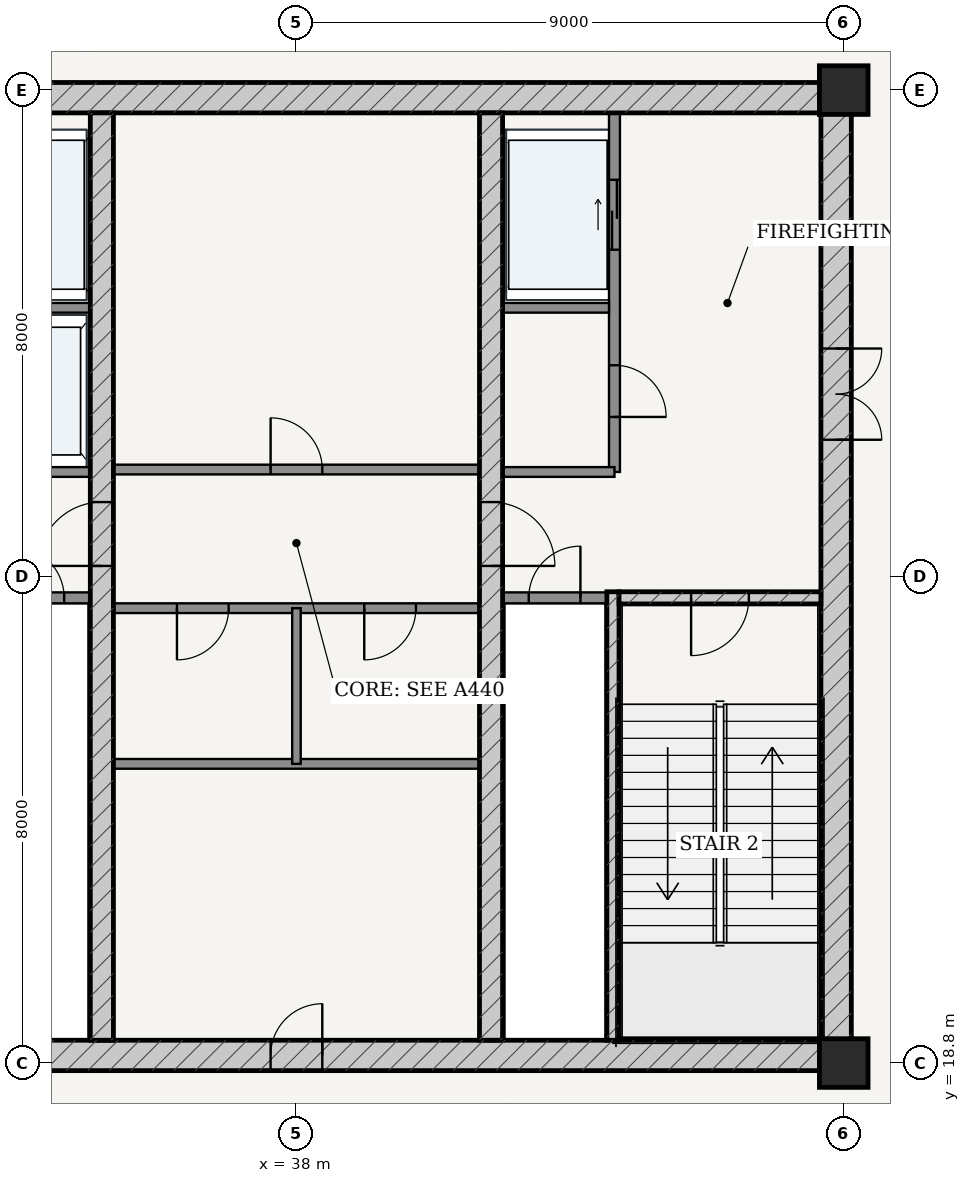
"""IFC4 building model, lengths in metres.
Left out: names, types, materials, properties, quantities, classifications, styles, units other than length and angle.
Written with IfcOpenShell. Run it as: python <this file> out.ifc"""

import sys

from ifc_helpers import new_model, si_unit, direction, frame, frame_2d, origin, origin_2d, place, context, subcontext, project, spatial, rectangle, extrude, source, transform, mapped, element, fill, save


model = new_model("IFC4")
c1 = context("Model", 3, precision=1e-05, world=origin(), true_north=direction((-0.2419218956, 0.970295726276)))
c2 = subcontext(c1, "Body", "Model", "MODEL_VIEW")
j1 = project(units=[si_unit("LENGTHUNIT", "METRE"), si_unit("PLANEANGLEUNIT", "RADIAN")], contexts=[c1])
p1 = place(None, origin())
s1 = spatial("IfcSite", under=j1, at=p1, CompositionType="ELEMENT")
p2 = place(p1, origin())
s2 = spatial("IfcBuilding", under=s1, at=p2, CompositionType="ELEMENT")
p3 = place(p2, frame((0.0, 0.0, 321.7)))
s3 = spatial("IfcBuildingStorey", under=s2, at=p3, CompositionType="ELEMENT", Elevation=321.7)
for number, where, z_axis, x_axis in (
    (1, (47.0, 18.8, 0.0), (0.0, 0.0, 1.0), (1.0, 0.0, 0.0)),
    (2, (47.0, 34.8, 0.0), (0.0, 0.0, 1.0), (1.0, 0.0, 0.0)),
):
    element("IfcColumn", number, at=place(p3, frame(where, z_axis=z_axis, x_axis=x_axis)), inside=s3, PredefinedType="COLUMN", context=c2, shape_type="SweptSolid", body=[
        extrude(rectangle(XDim=0.8, YDim=0.8, at=origin_2d()), origin(), (0.0, 0.0, 1.0), 5.2),
    ])
p4 = place(p3, frame((28.875, 18.925, 0.0), z_axis=(0.0, 0.0, 1.0), x_axis=(1.0, 0.0, 0.0)))
e3 = element("IfcWall", 3, at=p4, inside=s3, PredefinedType="SHEAR", context=c2, shape_type="SweptSolid", body=[
    extrude(rectangle(XDim=18.25, YDim=0.5, at=frame_2d((9.125, 0.0))), origin(), (0.0, 0.0, 1.0), 4.78),
])
p5 = place(p4, frame((8.7, 0.0, 0.0)))
e4 = element("IfcOpeningElement", 4, at=p5, cuts=e3, PredefinedType="OPENING", context=c2, shape_type="SweptSolid", body=[
    extrude(rectangle(XDim=0.85, YDim=2.1, at=frame_2d((0.425, 1.05))), frame((0.0, 0.26, 0.0), z_axis=(0.0, -1.0, 0.0), x_axis=(1.0, 0.0, 0.0)), (0.0, 0.0, 1.0), 0.52),
])
p6 = place(p3, frame((28.875, 34.675, 0.0), z_axis=(0.0, 0.0, 1.0), x_axis=(1.0, 0.0, 0.0)))
e5 = element("IfcWall", 5, at=p6, inside=s3, PredefinedType="SHEAR", context=c2, shape_type="SweptSolid", body=[
    extrude(rectangle(XDim=18.25, YDim=0.5, at=frame_2d((9.125, 0.0))), origin(), (0.0, 0.0, 1.0), 4.78),
])
p7 = place(p3, frame((46.875, 19.175, 0.0), z_axis=(0.0, 0.0, 1.0), x_axis=(0.0, 1.0, 0.0)))
e6 = element("IfcWall", 6, at=p7, inside=s3, PredefinedType="SHEAR", context=c2, shape_type="SweptSolid", body=[
    extrude(rectangle(XDim=15.25, YDim=0.5, at=frame_2d((7.625, 0.0))), origin(), (0.0, 0.0, 1.0), 4.78),
])
p8 = place(p7, frame((9.875, 0.0, 0.0)))
e7 = element("IfcOpeningElement", 7, at=p8, cuts=e6, PredefinedType="OPENING", context=c2, shape_type="SweptSolid", body=[
    extrude(rectangle(XDim=1.5, YDim=2.2, at=frame_2d((0.75, 1.1))), frame((0.0, 0.26, 0.0), z_axis=(0.0, -1.0, 0.0), x_axis=(1.0, 0.0, 0.0)), (0.0, 0.0, 1.0), 0.52),
])
p9 = place(p3, frame((43.205, 19.175, 0.0), z_axis=(0.0, 0.0, 1.0), x_axis=(0.0, 1.0, 0.0)))
e8 = element("IfcWall", 8, at=p9, inside=s3, PredefinedType="SOLIDWALL", context=c2, shape_type="SweptSolid", body=[
    extrude(rectangle(XDim=7.375, YDim=0.2, at=frame_2d((3.688, 0.0))), origin(), (0.0, 0.0, 1.0), 4.78),
])
p10 = place(p3, frame((43.305, 26.45, 0.0), z_axis=(0.0, 0.0, 1.0), x_axis=(1.0, 0.0, 0.0)))
e9 = element("IfcWall", 9, at=p10, inside=s3, PredefinedType="SOLIDWALL", context=c2, shape_type="SweptSolid", body=[
    extrude(rectangle(XDim=3.32, YDim=0.2, at=frame_2d((1.66, 0.0))), origin(), (0.0, 0.0, 1.0), 4.78),
])
p11 = place(p10, frame((1.185, 0.0, 0.0)))
e10 = element("IfcOpeningElement", 10, at=p11, cuts=e9, PredefinedType="OPENING", context=c2, shape_type="SweptSolid", body=[
    extrude(rectangle(XDim=0.95, YDim=2.15, at=frame_2d((0.475, 1.075))), frame((0.0, 0.11, 0.0), z_axis=(0.0, -1.0, 0.0), x_axis=(1.0, 0.0, 0.0)), (0.0, 0.0, 1.0), 0.22),
])
p12 = place(p3, frame((34.8, 19.175, 0.0), z_axis=(0.0, 0.0, 1.0), x_axis=(0.0, 1.0, 0.0)))
e11 = element("IfcWall", 11, at=p12, inside=s3, PredefinedType="SHEAR", context=c2, shape_type="SweptSolid", body=[
    extrude(rectangle(XDim=15.25, YDim=0.38, at=frame_2d((7.625, 0.0))), origin(), (0.0, 0.0, 1.0), 4.78),
])
p13 = place(p12, frame((7.8, 0.0, 0.0)))
e12 = element("IfcOpeningElement", 12, at=p13, cuts=e11, PredefinedType="OPENING", context=c2, shape_type="SweptSolid", body=[
    extrude(rectangle(XDim=1.05, YDim=2.15, at=frame_2d((0.525, 1.075))), frame((0.0, 0.2, 0.0), z_axis=(0.0, -1.0, 0.0), x_axis=(1.0, 0.0, 0.0)), (0.0, 0.0, 1.0), 0.4),
])
p14 = place(p3, frame((41.2, 19.175, 0.0), z_axis=(0.0, 0.0, 1.0), x_axis=(0.0, 1.0, 0.0)))
e13 = element("IfcWall", 13, at=p14, inside=s3, PredefinedType="SHEAR", context=c2, shape_type="SweptSolid", body=[
    extrude(rectangle(XDim=15.25, YDim=0.38, at=frame_2d((7.625, 0.0))), origin(), (0.0, 0.0, 1.0), 4.78),
])
p15 = place(p14, frame((7.8, 0.0, 0.0)))
e14 = element("IfcOpeningElement", 14, at=p15, cuts=e13, PredefinedType="OPENING", context=c2, shape_type="SweptSolid", body=[
    extrude(rectangle(XDim=1.05, YDim=2.15, at=frame_2d((0.525, 1.075))), frame((0.0, 0.2, 0.0), z_axis=(0.0, -1.0, 0.0), x_axis=(1.0, 0.0, 0.0)), (0.0, 0.0, 1.0), 0.4),
])
p16 = place(p3, frame((32.9, 26.45, 0.0), z_axis=(0.0, 0.0, 1.0), x_axis=(1.0, 0.0, 0.0)))
e15 = element("IfcWall", 15, at=p16, inside=s3, PredefinedType="PARTITIONING", context=c2, shape_type="SweptSolid", body=[
    extrude(rectangle(XDim=1.71, YDim=0.18, at=frame_2d((0.855, 0.0))), origin(), (0.0, 0.0, 1.0), 4.78),
])
p17 = place(p16, frame((0.43, 0.0, 0.0)))
e16 = element("IfcOpeningElement", 16, at=p17, cuts=e15, PredefinedType="OPENING", context=c2, shape_type="SweptSolid", body=[
    extrude(rectangle(XDim=0.85, YDim=2.1, at=frame_2d((0.425, 1.05))), frame((0.0, 0.1, 0.0), z_axis=(0.0, -1.0, 0.0), x_axis=(1.0, 0.0, 0.0)), (0.0, 0.0, 1.0), 0.2),
])
p18 = place(p3, frame((41.39, 26.45, 0.0), z_axis=(0.0, 0.0, 1.0), x_axis=(1.0, 0.0, 0.0)))
e17 = element("IfcWall", 17, at=p18, inside=s3, PredefinedType="PARTITIONING", context=c2, shape_type="SweptSolid", body=[
    extrude(rectangle(XDim=1.71, YDim=0.18, at=frame_2d((0.855, 0.0))), origin(), (0.0, 0.0, 1.0), 4.78),
])
p19 = place(p18, frame((0.43, 0.0, 0.0)))
e18 = element("IfcOpeningElement", 18, at=p19, cuts=e17, PredefinedType="OPENING", context=c2, shape_type="SweptSolid", body=[
    extrude(rectangle(XDim=0.85, YDim=2.1, at=frame_2d((0.425, 1.05))), frame((0.0, 0.1, 0.0), z_axis=(0.0, -1.0, 0.0), x_axis=(1.0, 0.0, 0.0)), (0.0, 0.0, 1.0), 0.2),
])
p20 = place(p3, frame((32.86, 31.22, 0.0), z_axis=(0.0, 0.0, 1.0), x_axis=(1.0, 0.0, 0.0)))
e19 = element("IfcWall", 19, at=p20, inside=s3, PredefinedType="PARTITIONING", context=c2, shape_type="SweptSolid", body=[
    extrude(rectangle(XDim=1.75, YDim=0.16, at=frame_2d((0.875, 0.0))), origin(), (0.0, 0.0, 1.0), 4.78),
])
p21 = place(p3, frame((32.77, 28.52, 0.0), z_axis=(0.0, 0.0, 1.0), x_axis=(1.0, 0.0, 0.0)))
e20 = element("IfcWall", 20, at=p21, inside=s3, PredefinedType="PARTITIONING", context=c2, shape_type="SweptSolid", body=[
    extrude(rectangle(XDim=1.84, YDim=0.16, at=frame_2d((0.92, 0.0))), origin(), (0.0, 0.0, 1.0), 4.78),
])
p22 = place(p3, frame((43.23, 28.52, 0.0), z_axis=(0.0, 0.0, 1.0), x_axis=(0.0, 1.0, 0.0)))
e21 = element("IfcWall", 21, at=p22, inside=s3, PredefinedType="PARTITIONING", context=c2, shape_type="SweptSolid", body=[
    extrude(rectangle(XDim=5.905, YDim=0.18, at=frame_2d((2.953, 0.0))), origin(), (0.0, 0.0, 1.0), 4.78),
])
p23 = place(p22, frame((0.905, 0.0, 0.0)))
e22 = element("IfcOpeningElement", 22, at=p23, cuts=e21, PredefinedType="OPENING", context=c2, shape_type="SweptSolid", body=[
    extrude(rectangle(XDim=0.85, YDim=2.1, at=frame_2d((0.425, 1.05))), frame((0.0, 0.1, 0.0), z_axis=(0.0, -1.0, 0.0), x_axis=(1.0, 0.0, 0.0)), (0.0, 0.0, 1.0), 0.2),
])
p24 = place(p22, frame((3.655, 0.0, 0.0)))
e23 = element("IfcOpeningElement", 23, at=p24, cuts=e21, PredefinedType="OPENING", context=c2, shape_type="SweptSolid", body=[
    extrude(rectangle(XDim=1.15, YDim=2.2, at=frame_2d((0.575, 1.1))), frame((0.0, 0.1, 0.0), z_axis=(0.0, -1.0, 0.0), x_axis=(1.0, 0.0, 0.0)), (0.0, 0.0, 1.0), 0.2),
])
p25 = place(p3, frame((41.39, 31.22, 0.0), z_axis=(0.0, 0.0, 1.0), x_axis=(1.0, 0.0, 0.0)))
e24 = element("IfcWall", 24, at=p25, inside=s3, PredefinedType="PARTITIONING", context=c2, shape_type="SweptSolid", body=[
    extrude(rectangle(XDim=1.75, YDim=0.16, at=frame_2d((0.875, 0.0))), origin(), (0.0, 0.0, 1.0), 4.78),
])
p26 = place(p3, frame((41.39, 28.52, 0.0), z_axis=(0.0, 0.0, 1.0), x_axis=(1.0, 0.0, 0.0)))
e25 = element("IfcWall", 25, at=p26, inside=s3, PredefinedType="PARTITIONING", context=c2, shape_type="SweptSolid", body=[
    extrude(rectangle(XDim=1.84, YDim=0.16, at=frame_2d((0.92, 0.0))), origin(), (0.0, 0.0, 1.0), 4.78),
])
p27 = place(p3, frame((34.99, 28.56, 0.0), z_axis=(0.0, 0.0, 1.0), x_axis=(1.0, 0.0, 0.0)))
e26 = element("IfcWall", 26, at=p27, inside=s3, PredefinedType="PARTITIONING", context=c2, shape_type="SweptSolid", body=[
    extrude(rectangle(XDim=6.02, YDim=0.16, at=frame_2d((3.01, 0.0))), origin(), (0.0, 0.0, 1.0), 4.78),
])
p28 = place(p27, frame((2.585, 0.0, 0.0)))
e27 = element("IfcOpeningElement", 27, at=p28, cuts=e26, PredefinedType="OPENING", context=c2, shape_type="SweptSolid", body=[
    extrude(rectangle(XDim=0.85, YDim=2.1, at=frame_2d((0.425, 1.05))), frame((0.0, 0.09, 0.0), z_axis=(0.0, -1.0, 0.0), x_axis=(1.0, 0.0, 0.0)), (0.0, 0.0, 1.0), 0.18),
])
p29 = place(p3, frame((34.99, 26.28, 0.0), z_axis=(0.0, 0.0, 1.0), x_axis=(1.0, 0.0, 0.0)))
e28 = element("IfcWall", 28, at=p29, inside=s3, PredefinedType="PARTITIONING", context=c2, shape_type="SweptSolid", body=[
    extrude(rectangle(XDim=6.02, YDim=0.16, at=frame_2d((3.01, 0.0))), origin(), (0.0, 0.0, 1.0), 4.78),
])
p30 = place(p29, frame((1.045, 0.0, 0.0)))
e29 = element("IfcOpeningElement", 29, at=p30, cuts=e28, PredefinedType="OPENING", context=c2, shape_type="SweptSolid", body=[
    extrude(rectangle(XDim=0.85, YDim=2.1, at=frame_2d((0.425, 1.05))), frame((0.0, 0.09, 0.0), z_axis=(0.0, -1.0, 0.0), x_axis=(1.0, 0.0, 0.0)), (0.0, 0.0, 1.0), 0.18),
])
p31 = place(p29, frame((4.125, 0.0, 0.0)))
e30 = element("IfcOpeningElement", 30, at=p31, cuts=e28, PredefinedType="OPENING", context=c2, shape_type="SweptSolid", body=[
    extrude(rectangle(XDim=0.85, YDim=2.1, at=frame_2d((0.425, 1.05))), frame((0.0, 0.09, 0.0), z_axis=(0.0, -1.0, 0.0), x_axis=(1.0, 0.0, 0.0)), (0.0, 0.0, 1.0), 0.18),
])
p32 = place(p3, frame((34.99, 23.72, 0.0), z_axis=(0.0, 0.0, 1.0), x_axis=(1.0, 0.0, 0.0)))
e31 = element("IfcWall", 31, at=p32, inside=s3, PredefinedType="PARTITIONING", context=c2, shape_type="SweptSolid", body=[
    extrude(rectangle(XDim=6.02, YDim=0.16, at=frame_2d((3.01, 0.0))), origin(), (0.0, 0.0, 1.0), 4.78),
])
p33 = place(p3, frame((38.0, 23.72, 0.0), z_axis=(0.0, 0.0, 1.0), x_axis=(0.0, 1.0, 0.0)))
e32 = element("IfcWall", 32, at=p33, inside=s3, PredefinedType="PARTITIONING", context=c2, shape_type="SweptSolid", body=[
    extrude(rectangle(XDim=2.56, YDim=0.14, at=frame_2d((1.28, 0.0))), origin(), (0.0, 0.0, 1.0), 4.78),
])
m1 = source(origin(), c2, "Body", "SweptSolid", [
    extrude(rectangle(XDim=1.5, YDim=2.2, at=frame_2d((0.75, 1.1))), frame((0.0, 0.025, 0.0), z_axis=(0.0, -1.0, 0.0), x_axis=(1.0, 0.0, 0.0)), (0.0, 0.0, 1.0), 0.05),
])
p34 = place(p8, frame((1.5, 0.0, 0.0), z_axis=(0.0, 0.0, 1.0), x_axis=(-1.0, 0.0, 0.0)))
e33 = element("IfcDoor", 33, at=p34, inside=s3, OperationType="DOUBLE_DOOR_SINGLE_SWING", PredefinedType="DOOR", context=c2, shape_type="MappedRepresentation", body=[
    mapped(m1, transform((0.0, 0.0, 0.0), scale=1.0)),
])
fill(e7, e33)
m2 = source(origin(), c2, "Body", "SweptSolid", [
    extrude(rectangle(XDim=1.05, YDim=2.15, at=frame_2d((0.525, 1.075))), frame((0.0, 0.025, 0.0), z_axis=(0.0, -1.0, 0.0), x_axis=(1.0, 0.0, 0.0)), (0.0, 0.0, 1.0), 0.05),
])
p35 = place(p13, origin())
e34 = element("IfcDoor", 34, at=p35, inside=s3, OperationType="SINGLE_SWING_LEFT", PredefinedType="DOOR", context=c2, shape_type="MappedRepresentation", body=[
    mapped(m2, transform((0.0, 0.0, 0.0), scale=1.0)),
])
fill(e12, e34)
p36 = place(p15, frame((1.05, 0.0, 0.0), z_axis=(0.0, 0.0, 1.0), x_axis=(-1.0, 0.0, 0.0)))
e35 = element("IfcDoor", 35, at=p36, inside=s3, OperationType="SINGLE_SWING_RIGHT", PredefinedType="DOOR", context=c2, shape_type="MappedRepresentation", body=[
    mapped(m2, transform((0.0, 0.0, 0.0), scale=1.0)),
])
fill(e14, e35)
m3 = source(origin(), c2, "Body", "SweptSolid", [
    extrude(rectangle(XDim=0.95, YDim=2.15, at=frame_2d((0.475, 1.075))), frame((0.0, 0.025, 0.0), z_axis=(0.0, -1.0, 0.0), x_axis=(1.0, 0.0, 0.0)), (0.0, 0.0, 1.0), 0.05),
])
p37 = place(p11, frame((0.95, 0.0, 0.0), z_axis=(0.0, 0.0, 1.0), x_axis=(-1.0, 0.0, 0.0)))
e36 = element("IfcDoor", 36, at=p37, inside=s3, OperationType="SINGLE_SWING_RIGHT", PredefinedType="DOOR", context=c2, shape_type="MappedRepresentation", body=[
    mapped(m3, transform((0.0, 0.0, 0.0), scale=1.0)),
])
fill(e10, e36)
m4 = source(origin(), c2, "Body", "SweptSolid", [
    extrude(rectangle(XDim=0.85, YDim=2.1, at=frame_2d((0.425, 1.05))), frame((0.0, 0.025, 0.0), z_axis=(0.0, -1.0, 0.0), x_axis=(1.0, 0.0, 0.0)), (0.0, 0.0, 1.0), 0.05),
])
p38 = place(p17, origin())
e37 = element("IfcDoor", 37, at=p38, inside=s3, OperationType="SINGLE_SWING_LEFT", PredefinedType="DOOR", context=c2, shape_type="MappedRepresentation", body=[
    mapped(m4, transform((0.0, 0.0, 0.0), scale=1.0)),
])
fill(e16, e37)
p39 = place(p19, origin())
e38 = element("IfcDoor", 38, at=p39, inside=s3, OperationType="SINGLE_SWING_RIGHT", PredefinedType="DOOR", context=c2, shape_type="MappedRepresentation", body=[
    mapped(m4, transform((0.0, 0.0, 0.0), scale=1.0)),
])
fill(e18, e38)
p40 = place(p23, frame((0.85, 0.0, 0.0), z_axis=(0.0, 0.0, 1.0), x_axis=(-1.0, 0.0, 0.0)))
e39 = element("IfcDoor", 39, at=p40, inside=s3, OperationType="SINGLE_SWING_RIGHT", PredefinedType="DOOR", context=c2, shape_type="MappedRepresentation", body=[
    mapped(m4, transform((0.0, 0.0, 0.0), scale=1.0)),
])
fill(e22, e39)
p41 = place(p28, origin())
e40 = element("IfcDoor", 40, at=p41, inside=s3, OperationType="SINGLE_SWING_LEFT", PredefinedType="DOOR", context=c2, shape_type="MappedRepresentation", body=[
    mapped(m4, transform((0.0, 0.0, 0.0), scale=1.0)),
])
fill(e27, e40)
p42 = place(p30, frame((0.85, 0.0, 0.0), z_axis=(0.0, 0.0, 1.0), x_axis=(-1.0, 0.0, 0.0)))
e41 = element("IfcDoor", 41, at=p42, inside=s3, OperationType="SINGLE_SWING_RIGHT", PredefinedType="DOOR", context=c2, shape_type="MappedRepresentation", body=[
    mapped(m4, transform((0.0, 0.0, 0.0), scale=1.0)),
])
fill(e29, e41)
p43 = place(p31, frame((0.85, 0.0, 0.0), z_axis=(0.0, 0.0, 1.0), x_axis=(-1.0, 0.0, 0.0)))
e42 = element("IfcDoor", 42, at=p43, inside=s3, OperationType="SINGLE_SWING_RIGHT", PredefinedType="DOOR", context=c2, shape_type="MappedRepresentation", body=[
    mapped(m4, transform((0.0, 0.0, 0.0), scale=1.0)),
])
fill(e30, e42)
p44 = place(p5, origin())
e43 = element("IfcDoor", 43, at=p44, inside=s3, OperationType="SINGLE_SWING_RIGHT", PredefinedType="DOOR", context=c2, shape_type="MappedRepresentation", body=[
    mapped(m4, transform((0.0, 0.0, 0.0), scale=1.0)),
])
fill(e4, e43)
m5 = source(origin(), c2, "Body", "SweptSolid", [
    extrude(rectangle(XDim=1.15, YDim=2.2, at=frame_2d((0.575, 1.1))), frame((0.0, 0.025, 0.0), z_axis=(0.0, -1.0, 0.0), x_axis=(1.0, 0.0, 0.0)), (0.0, 0.0, 1.0), 0.05),
])
p45 = place(p24, origin())
e44 = element("IfcDoor", 44, at=p45, inside=s3, OperationType="DOUBLE_DOOR_SLIDING", PredefinedType="DOOR", context=c2, shape_type="MappedRepresentation", body=[
    mapped(m5, transform((0.0, 0.0, 0.0), scale=1.0)),
])
fill(e23, e44)
save(model, sys.argv[1])
